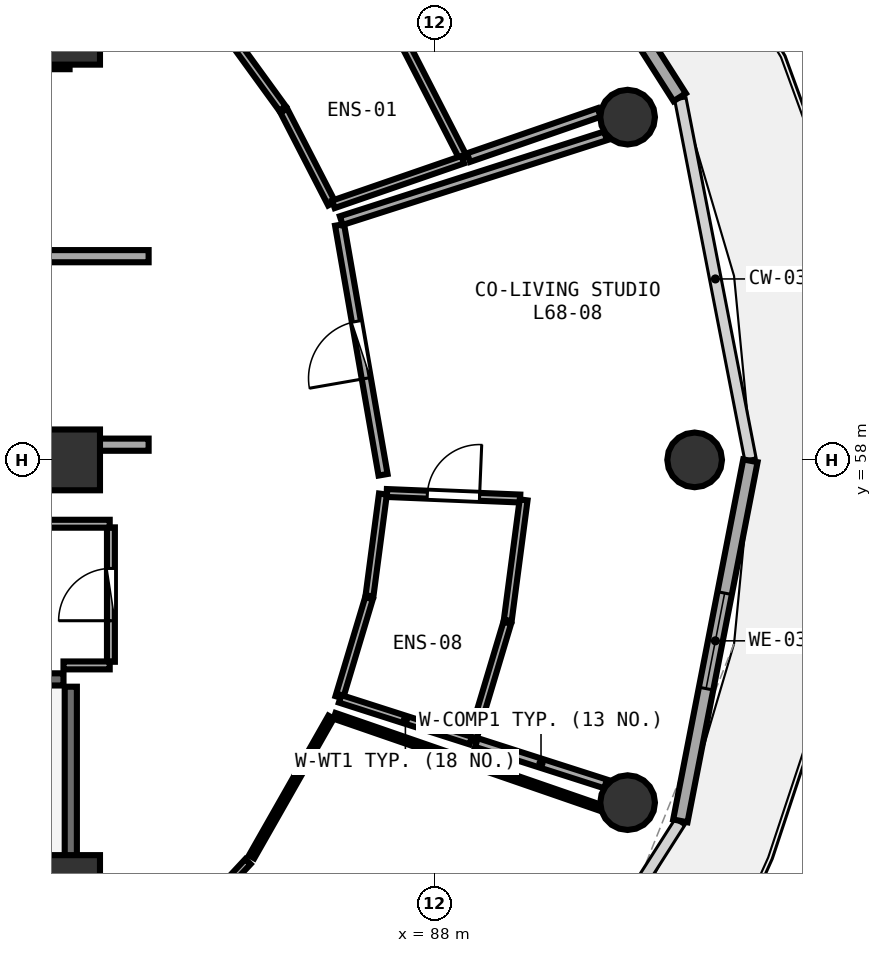
"""IFC4 building model, lengths in metres.
Left out: names, types, materials, properties, quantities, classifications, styles, units other than length and angle.
Written with IfcOpenShell. Run it as: python <this file> out.ifc"""

import sys

from ifc_helpers import new_model, si_unit, direction, frame, frame_2d, origin, origin_2d, place, context, subcontext, project, spatial, rectangle, circle, extrude, element, fill, save


model = new_model("IFC4")
c1 = context("Model", 3, precision=1e-05, world=origin(), true_north=direction((0.0, 1.0)))
c2 = subcontext(c1, "Body", "Model", "MODEL_VIEW")
j1 = project(units=[si_unit("LENGTHUNIT", "METRE"), si_unit("PLANEANGLEUNIT", "RADIAN")], contexts=[c1])
p1 = place(None, origin())
s1 = spatial("IfcSite", under=j1, at=p1, CompositionType="ELEMENT")
p2 = place(p1, origin())
s2 = spatial("IfcBuilding", under=s1, at=p2, CompositionType="ELEMENT")
p3 = place(p2, frame((0.0, 0.0, 267.45)))
s3 = spatial("IfcBuildingStorey", under=s2, at=p3, CompositionType="ELEMENT", Elevation=267.45)
for number, where, z_axis, x_axis in (
    (1, (82.0, 51.0, 0.0), (0.0, 0.0, 1.0), (1.0, 0.0, 0.0)),
    (2, (82.0, 58.0, 0.0), (0.0, 0.0, 1.0), (1.0, 0.0, 0.0)),
    (3, (82.0, 65.0, 0.0), (0.0, 0.0, 1.0), (1.0, 0.0, 0.0)),
):
    element("IfcColumn", number, at=place(p3, frame(where, z_axis=z_axis, x_axis=x_axis)), inside=s3, PredefinedType="PILASTER", context=c2, shape_type="SweptSolid", body=[
        extrude(rectangle(XDim=1.0, YDim=1.0, at=origin_2d()), origin(), (0.0, 0.0, 1.0), 3.75),
    ])
for number, where, z_axis, x_axis in (
    (4, (92.28, 58.0, 0.0), (0.0, 0.0, 1.0), (1.0, 0.0, 0.0)),
    (5, (91.177, 63.636, 0.0), (0.0, 0.0, 1.0), (1.0, 0.0, 0.0)),
    (6, (91.177, 52.364, 0.0), (0.0, 0.0, 1.0), (1.0, 0.0, 0.0)),
):
    element("IfcColumn", number, at=place(p3, frame(where, z_axis=z_axis, x_axis=x_axis)), inside=s3, PredefinedType="COLUMN", context=c2, shape_type="SweptSolid", body=[
        extrude(circle(Radius=0.45, at=origin_2d()), origin(), (0.0, 0.0, 1.0), 3.75),
    ])
p4 = place(p3, frame((92.034, 63.964, 0.0), z_axis=(0.0, 0.0, 1.0), x_axis=(-0.537271968456, 0.843409053728, 0.0)))
e7 = element("IfcWall", 7, at=p4, inside=s3, PredefinedType="SOLIDWALL", context=c2, shape_type="SweptSolid", body=[
    extrude(rectangle(XDim=6.175, YDim=0.24, at=frame_2d((3.087, 0.0))), origin(), (0.0, 0.0, 1.0), 3.475),
])
p5 = place(p4, frame((2.613, 0.0, 0.0)))
e8 = element("IfcOpeningElement", 8, at=p5, cuts=e7, PredefinedType="OPENING", context=c2, shape_type="SweptSolid", body=[
    extrude(rectangle(XDim=0.95, YDim=2.1, at=frame_2d((0.475, 1.05))), frame((0.0, 0.13, 0.0), z_axis=(0.0, -1.0, 0.0), x_axis=(1.0, 0.0, 0.0)), (0.0, 0.0, 1.0), 0.26),
])
p6 = place(p4, frame((3.913, 0.0, 0.85)))
e9 = element("IfcOpeningElement", 9, at=p6, cuts=e7, PredefinedType="OPENING", context=c2, shape_type="SweptSolid", body=[
    extrude(rectangle(XDim=1.2, YDim=1.45, at=frame_2d((0.6, 0.725))), frame((0.0, 0.13, 0.0), z_axis=(0.0, -1.0, 0.0), x_axis=(1.0, 0.0, 0.0)), (0.0, 0.0, 1.0), 0.26),
])
p7 = place(p3, frame((92.045, 52.063, 0.0), z_axis=(0.0, 0.0, 1.0), x_axis=(0.190969309115, 0.981596008028, 0.0)))
e10 = element("IfcWall", 10, at=p7, inside=s3, PredefinedType="SOLIDWALL", context=c2, shape_type="SweptSolid", body=[
    extrude(rectangle(XDim=6.033, YDim=0.24, at=frame_2d((3.017, 0.0))), origin(), (0.0, 0.0, 1.0), 3.475),
])
p8 = place(p7, frame((2.216, 0.0, 0.85)))
e11 = element("IfcOpeningElement", 11, at=p8, cuts=e10, PredefinedType="OPENING", context=c2, shape_type="SweptSolid", body=[
    extrude(rectangle(XDim=1.6, YDim=1.45, at=frame_2d((0.8, 0.725))), frame((0.0, 0.13, 0.0), z_axis=(0.0, -1.0, 0.0), x_axis=(1.0, 0.0, 0.0)), (0.0, 0.0, 1.0), 0.26),
])
p9 = place(p3, frame((82.02, 51.2, 0.0), z_axis=(0.0, 0.0, 1.0), x_axis=(0.0, 1.0, 0.0)))
e12 = element("IfcWall", 12, at=p9, inside=s3, PredefinedType="SHEAR", context=c2, shape_type="SweptSolid", body=[
    extrude(rectangle(XDim=3.07, YDim=0.2, at=frame_2d((1.535, 0.0))), origin(), (0.0, 0.0, 1.0), 3.49),
])
p10 = place(p3, frame((81.9, 54.39, 0.0), z_axis=(0.0, 0.0, 1.0), x_axis=(-1.0, 0.0, 0.0)))
e13 = element("IfcWall", 13, at=p10, inside=s3, PredefinedType="SHEAR", context=c2, shape_type="SweptSolid", body=[
    extrude(rectangle(XDim=8.46, YDim=0.2, at=frame_2d((4.23, 0.0))), origin(), (0.0, 0.0, 1.0), 3.49),
])
p11 = place(p3, frame((74.0, 64.6, 0.0), z_axis=(0.0, 0.0, 1.0), x_axis=(1.0, 0.0, 0.0)))
e14 = element("IfcWall", 14, at=p11, inside=s3, PredefinedType="SHEAR", context=c2, shape_type="SweptSolid", body=[
    extrude(rectangle(XDim=8.0, YDim=0.35, at=frame_2d((4.0, 0.0))), origin(), (0.0, 0.0, 1.0), 3.49),
])
p12 = place(p3, frame((79.3, 61.35, 0.0), z_axis=(0.0, 0.0, 1.0), x_axis=(1.0, 0.0, 0.0)))
e15 = element("IfcWall", 15, at=p12, inside=s3, PredefinedType="SOLIDWALL", context=c2, shape_type="SweptSolid", body=[
    extrude(rectangle(XDim=4.0, YDim=0.2, at=frame_2d((2.0, 0.0))), origin(), (0.0, 0.0, 1.0), 2.775),
])
p13 = place(p12, frame((0.45, 0.0, 0.0)))
e16 = element("IfcOpeningElement", 16, at=p13, cuts=e15, PredefinedType="OPENING", context=c2, shape_type="SweptSolid", body=[
    extrude(rectangle(XDim=1.2, YDim=2.15, at=frame_2d((0.6, 1.075))), frame((0.0, 0.11, 0.0), z_axis=(0.0, -1.0, 0.0), x_axis=(1.0, 0.0, 0.0)), (0.0, 0.0, 1.0), 0.22),
])
p14 = place(p3, frame((79.3, 58.25, 0.0), z_axis=(0.0, 0.0, 1.0), x_axis=(1.0, 0.0, 0.0)))
e17 = element("IfcWall", 17, at=p14, inside=s3, PredefinedType="SOLIDWALL", context=c2, shape_type="SweptSolid", body=[
    extrude(rectangle(XDim=4.0, YDim=0.2, at=frame_2d((2.0, 0.0))), origin(), (0.0, 0.0, 1.0), 2.775),
])
p15 = place(p14, frame((0.5, 0.0, 0.0)))
e18 = element("IfcOpeningElement", 18, at=p15, cuts=e17, PredefinedType="OPENING", context=c2, shape_type="SweptSolid", body=[
    extrude(rectangle(XDim=1.1, YDim=2.1, at=frame_2d((0.55, 1.05))), frame((0.0, 0.11, 0.0), z_axis=(0.0, -1.0, 0.0), x_axis=(1.0, 0.0, 0.0)), (0.0, 0.0, 1.0), 0.22),
])
p16 = place(p3, frame((82.68, 54.68, 0.0), z_axis=(0.0, 0.0, 1.0), x_axis=(0.0, 1.0, 0.0)))
e19 = element("IfcWall", 19, at=p16, inside=s3, PredefinedType="PLUMBINGWALL", context=c2, shape_type="SweptSolid", body=[
    extrude(rectangle(XDim=2.21, YDim=0.13, at=frame_2d((1.105, 0.0))), origin(), (0.0, 0.0, 1.0), 3.48),
])
p17 = place(p16, frame((0.675, 0.0, 0.0)))
e20 = element("IfcOpeningElement", 20, at=p17, cuts=e19, PredefinedType="OPENING", context=c2, shape_type="SweptSolid", body=[
    extrude(rectangle(XDim=0.86, YDim=2.05, at=frame_2d((0.43, 1.025))), frame((0.0, 0.075, 0.0), z_axis=(0.0, -1.0, 0.0), x_axis=(1.0, 0.0, 0.0)), (0.0, 0.0, 1.0), 0.15),
])
p18 = place(p3, frame((83.118, 49.443, 0.0), z_axis=(0.0, 0.0, 1.0), x_axis=(0.681315269885, 0.731990097625, 0.0)))
e21 = element("IfcWall", 21, at=p18, inside=s3, PredefinedType="PARTITIONING", context=c2, shape_type="SweptSolid", body=[
    extrude(rectangle(XDim=2.664, YDim=0.12, at=frame_2d((1.332, 0.0))), origin(), (0.0, 0.0, 1.0), 3.075),
])
p19 = place(p18, frame((0.882, 0.0, 0.0)))
e22 = element("IfcOpeningElement", 22, at=p19, cuts=e21, PredefinedType="OPENING", context=c2, shape_type="SweptSolid", body=[
    extrude(rectangle(XDim=0.9, YDim=2.08, at=frame_2d((0.45, 1.04))), frame((0.0, 0.07, 0.0), z_axis=(0.0, -1.0, 0.0), x_axis=(1.0, 0.0, 0.0)), (0.0, 0.0, 1.0), 0.14),
])
p20 = place(p3, frame((87.216, 57.456, 0.0), z_axis=(0.0, 0.0, 1.0), x_axis=(0.999139994921, -0.041464087462, 0.0)))
e23 = element("IfcWall", 23, at=p20, inside=s3, PredefinedType="PLUMBINGWALL", context=c2, shape_type="SweptSolid", body=[
    extrude(rectangle(XDim=2.196, YDim=0.13, at=frame_2d((1.098, 0.0))), origin(), (0.0, 0.0, 1.0), 3.175),
])
p21 = place(p20, frame((0.668, 0.0, 0.0)))
e24 = element("IfcOpeningElement", 24, at=p21, cuts=e23, PredefinedType="OPENING", context=c2, shape_type="SweptSolid", body=[
    extrude(rectangle(XDim=0.86, YDim=2.05, at=frame_2d((0.43, 1.025))), frame((0.0, 0.075, 0.0), z_axis=(0.0, -1.0, 0.0), x_axis=(1.0, 0.0, 0.0)), (0.0, 0.0, 1.0), 0.15),
])
p22 = place(p3, frame((87.156, 57.755, 0.0), z_axis=(0.0, 0.0, 1.0), x_axis=(-0.171570913007, 0.985171772743, 0.0)))
e25 = element("IfcWall", 25, at=p22, inside=s3, PredefinedType="PARTITIONING", context=c2, shape_type="SweptSolid", body=[
    extrude(rectangle(XDim=4.171, YDim=0.15, at=frame_2d((2.085, 0.0))), origin(), (0.0, 0.0, 1.0), 3.075),
])
p23 = place(p22, frame((1.61, 0.0, 0.0)))
e26 = element("IfcOpeningElement", 26, at=p23, cuts=e25, PredefinedType="OPENING", context=c2, shape_type="SweptSolid", body=[
    extrude(rectangle(XDim=0.95, YDim=2.08, at=frame_2d((0.475, 1.04))), frame((0.0, 0.085, 0.0), z_axis=(0.0, -1.0, 0.0), x_axis=(1.0, 0.0, 0.0)), (0.0, 0.0, 1.0), 0.17),
])
p24 = place(p3, frame((81.9, 54.62, 0.0), z_axis=(0.0, 0.0, 1.0), x_axis=(1.0, 0.0, 0.0)))
e27 = element("IfcWall", 27, at=p24, inside=s3, PredefinedType="PLUMBINGWALL", context=c2, shape_type="SweptSolid", body=[
    extrude(rectangle(XDim=0.76, YDim=0.13, at=frame_2d((0.38, 0.0))), origin(), (0.0, 0.0, 1.0), 2.775),
])
p25 = place(p3, frame((82.66, 56.95, 0.0), z_axis=(0.0, 0.0, 1.0), x_axis=(-1.0, 0.0, 0.0)))
e28 = element("IfcWall", 28, at=p25, inside=s3, PredefinedType="PLUMBINGWALL", context=c2, shape_type="SweptSolid", body=[
    extrude(rectangle(XDim=1.59, YDim=0.13, at=frame_2d((0.795, 0.0))), origin(), (0.0, 0.0, 1.0), 2.775),
])
p26 = place(p3, frame((86.311, 62.214, 0.0), z_axis=(0.0, 0.0, 1.0), x_axis=(-0.457623641393, 0.889145996357, 0.0)))
e29 = element("IfcWall", 29, at=p26, inside=s3, PredefinedType="PLUMBINGWALL", context=c2, shape_type="SweptSolid", body=[
    extrude(rectangle(XDim=1.721, YDim=0.13, at=frame_2d((0.86, 0.0))), origin(), (0.0, 0.0, 1.0), 3.235),
])
p27 = place(p3, frame((85.502, 63.778, 0.0), z_axis=(0.0, 0.0, 1.0), x_axis=(-0.587439614451, 0.809268002193, 0.0)))
e30 = element("IfcWall", 30, at=p27, inside=s3, PredefinedType="PLUMBINGWALL", context=c2, shape_type="SweptSolid", body=[
    extrude(rectangle(XDim=1.746, YDim=0.13, at=frame_2d((0.873, 0.0))), origin(), (0.0, 0.0, 1.0), 3.075),
])
p28 = place(p3, frame((87.548, 64.772, 0.0), z_axis=(0.0, 0.0, 1.0), x_axis=(0.456453063126, -0.889747492923, 0.0)))
e31 = element("IfcWall", 31, at=p28, inside=s3, PredefinedType="PLUMBINGWALL", context=c2, shape_type="SweptSolid", body=[
    extrude(rectangle(XDim=2.035, YDim=0.13, at=frame_2d((1.017, 0.0))), origin(), (0.0, 0.0, 1.0), 3.075),
])
p29 = place(p3, frame((88.467, 62.938, 0.0), z_axis=(0.0, 0.0, 1.0), x_axis=(-0.94520115701, -0.326488549244, 0.0)))
e32 = element("IfcWall", 32, at=p29, inside=s3, PredefinedType="PLUMBINGWALL", context=c2, shape_type="SweptSolid", body=[
    extrude(rectangle(XDim=2.251, YDim=0.13, at=frame_2d((1.126, 0.0))), origin(), (0.0, 0.0, 1.0), 3.175),
])
p30 = place(p3, frame((90.709, 63.713, 0.0), z_axis=(0.0, 0.0, 1.0), x_axis=(-0.945132905081, -0.326686075207, 0.0)))
e33 = element("IfcWall", 33, at=p30, inside=s3, PredefinedType="PARTITIONING", context=c2, shape_type="SweptSolid", body=[
    extrude(rectangle(XDim=2.272, YDim=0.15, at=frame_2d((1.136, 0.0))), origin(), (0.0, 0.0, 1.0), 3.075),
])
p31 = place(p3, frame((84.994, 51.472, 0.0), z_axis=(0.0, 0.0, 1.0), x_axis=(0.494277588427, 0.869304127207, 0.0)))
e34 = element("IfcWall", 34, at=p31, inside=s3, PredefinedType="PARTITIONING", context=c2, shape_type="SweptSolid", body=[
    extrude(rectangle(XDim=2.643, YDim=0.1, at=frame_2d((1.322, 0.0))), origin(), (0.0, 0.0, 1.0), 3.075),
])
p32 = place(p3, frame((86.358, 53.791, 0.0), z_axis=(0.0, 0.0, 1.0), x_axis=(0.945103281494, -0.326771766388, 0.0)))
e35 = element("IfcWall", 35, at=p32, inside=s3, PredefinedType="PARTITIONING", context=c2, shape_type="SweptSolid", body=[
    extrude(rectangle(XDim=4.604, YDim=0.1, at=frame_2d((2.302, 0.0))), origin(), (0.0, 0.0, 1.0), 3.075),
])
p33 = place(p3, frame((86.436, 54.096, 0.0), z_axis=(0.0, 0.0, 1.0), x_axis=(0.287308367232, 0.957838139833, 0.0)))
e36 = element("IfcWall", 36, at=p33, inside=s3, PredefinedType="PLUMBINGWALL", context=c2, shape_type="SweptSolid", body=[
    extrude(rectangle(XDim=1.7, YDim=0.13, at=frame_2d((0.85, 0.0))), origin(), (0.0, 0.0, 1.0), 3.48),
])
p34 = place(p3, frame((86.933, 55.764, 0.0), z_axis=(0.0, 0.0, 1.0), x_axis=(0.130686363399, 0.991423761275, 0.0)))
e37 = element("IfcWall", 37, at=p34, inside=s3, PredefinedType="PLUMBINGWALL", context=c2, shape_type="SweptSolid", body=[
    extrude(rectangle(XDim=1.689, YDim=0.13, at=frame_2d((0.844, 0.0))), origin(), (0.0, 0.0, 1.0), 3.48),
])
p35 = place(p3, frame((89.467, 57.342, 0.0), z_axis=(0.0, 0.0, 1.0), x_axis=(-0.130467152696, -0.991452632286, 0.0)))
e38 = element("IfcWall", 38, at=p35, inside=s3, PredefinedType="PLUMBINGWALL", context=c2, shape_type="SweptSolid", body=[
    extrude(rectangle(XDim=1.999, YDim=0.13, at=frame_2d((0.999, 0.0))), origin(), (0.0, 0.0, 1.0), 3.48),
])
p36 = place(p3, frame((89.198, 55.322, 0.0), z_axis=(0.0, 0.0, 1.0), x_axis=(-0.286890981069, -0.957963237803, 0.0)))
e39 = element("IfcWall", 39, at=p36, inside=s3, PredefinedType="PLUMBINGWALL", context=c2, shape_type="SweptSolid", body=[
    extrude(rectangle(XDim=2.01, YDim=0.13, at=frame_2d((1.005, 0.0))), origin(), (0.0, 0.0, 1.0), 3.48),
])
p37 = place(p3, frame((88.597, 53.383, 0.0), z_axis=(0.0, 0.0, 1.0), x_axis=(-0.952372601519, 0.304936760454, 0.0)))
e40 = element("IfcWall", 40, at=p37, inside=s3, PredefinedType="PLUMBINGWALL", context=c2, shape_type="SweptSolid", body=[
    extrude(rectangle(XDim=2.255, YDim=0.13, at=frame_2d((1.128, 0.0))), origin(), (0.0, 0.0, 1.0), 3.175),
])
p38 = place(p3, frame((86.468, 61.935, 0.0), z_axis=(0.0, 0.0, 1.0), x_axis=(0.95227750557, 0.305233602976, 0.0)))
e41 = element("IfcWall", 41, at=p38, inside=s3, PredefinedType="PARTITIONING", context=c2, shape_type="SweptSolid", body=[
    extrude(rectangle(XDim=4.565, YDim=0.15, at=frame_2d((2.283, 0.0))), origin(), (0.0, 0.0, 1.0), 3.175),
])
p39 = place(p3, frame((90.816, 52.671, 0.0), z_axis=(0.0, 0.0, 1.0), x_axis=(-0.952285550261, 0.305208503755, 0.0)))
e42 = element("IfcWall", 42, at=p39, inside=s3, PredefinedType="PARTITIONING", context=c2, shape_type="SweptSolid", body=[
    extrude(rectangle(XDim=2.231, YDim=0.15, at=frame_2d((1.115, 0.0))), origin(), (0.0, 0.0, 1.0), 3.235),
])
p40 = place(p8, origin())
e43 = element("IfcWindow", 43, at=p40, inside=s3, PartitioningType="SINGLE_PANEL", PredefinedType="WINDOW", context=c2, shape_type="SweptSolid", body=[
    extrude(rectangle(XDim=1.6, YDim=1.45, at=frame_2d((0.8, 0.725))), frame((0.0, 0.03, 0.0), z_axis=(0.0, -1.0, 0.0), x_axis=(1.0, 0.0, 0.0)), (0.0, 0.0, 1.0), 0.06),
])
fill(e11, e43)
p41 = place(p17, origin())
e44 = element("IfcDoor", 44, at=p41, inside=s3, OperationType="SINGLE_SWING_LEFT", PredefinedType="DOOR", context=c2, shape_type="SweptSolid", body=[
    extrude(rectangle(XDim=0.86, YDim=2.05, at=frame_2d((0.43, 1.025))), frame((0.0, 0.025, 0.0), z_axis=(0.0, -1.0, 0.0), x_axis=(1.0, 0.0, 0.0)), (0.0, 0.0, 1.0), 0.05),
])
fill(e20, e44)
p42 = place(p21, origin())
e45 = element("IfcDoor", 45, at=p42, inside=s3, OperationType="SINGLE_SWING_RIGHT", PredefinedType="DOOR", context=c2, shape_type="SweptSolid", body=[
    extrude(rectangle(XDim=0.86, YDim=2.05, at=frame_2d((0.43, 1.025))), frame((0.0, 0.025, 0.0), z_axis=(0.0, -1.0, 0.0), x_axis=(1.0, 0.0, 0.0)), (0.0, 0.0, 1.0), 0.05),
])
fill(e24, e45)
p43 = place(p23, origin())
e46 = element("IfcDoor", 46, at=p43, inside=s3, OperationType="SINGLE_SWING_LEFT", PredefinedType="DOOR", context=c2, shape_type="SweptSolid", body=[
    extrude(rectangle(XDim=0.95, YDim=2.08, at=frame_2d((0.475, 1.04))), frame((0.0, 0.025, 0.0), z_axis=(0.0, -1.0, 0.0), x_axis=(1.0, 0.0, 0.0)), (0.0, 0.0, 1.0), 0.05),
])
fill(e26, e46)
save(model, sys.argv[1])
